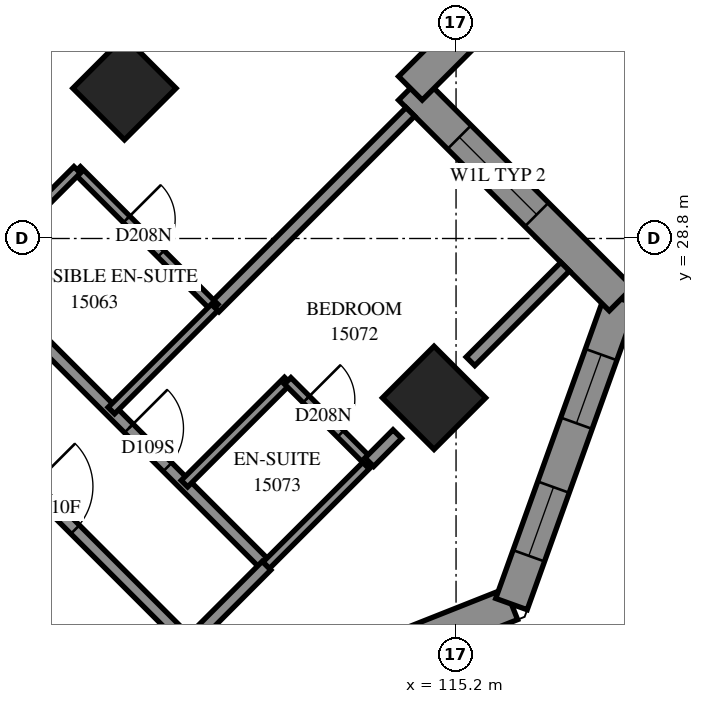
"""IFC4 building model, lengths in metres.
Left out: names, types, materials, properties, quantities, classifications, styles, units other than length and angle.
Written with IfcOpenShell. Run it as: python <this file> out.ifc"""

import sys

from ifc_helpers import new_model, si_unit, direction, frame, frame_2d, origin, origin_2d, place, context, subcontext, project, spatial, polyline, rectangle, outline, extrude, element, fill, save


model = new_model("IFC4")
c1 = context("Model", 3, precision=1e-05, world=origin(), true_north=direction((0.0, 1.0)))
c2 = subcontext(c1, "Body", "Model", "MODEL_VIEW")
j1 = project(units=[si_unit("LENGTHUNIT", "METRE"), si_unit("PLANEANGLEUNIT", "RADIAN")], contexts=[c1])
p1 = place(None, origin())
s1 = spatial("IfcSite", under=j1, at=p1, CompositionType="ELEMENT")
p2 = place(p1, origin())
s2 = spatial("IfcBuilding", under=s1, at=p2, CompositionType="ELEMENT")
p3 = place(p2, frame((0.0, 0.0, 57.6)))
s3 = spatial("IfcBuildingStorey", under=s2, at=p3, CompositionType="ELEMENT", Elevation=57.6)
for number, where, z_axis, x_axis in (
    (1, (109.747, 31.271, 0.0), (0.0, 0.0, 1.0), (0.707, -0.707, 0.0)),
    (2, (114.838, 26.18, 0.0), (0.0, 0.0, 1.0), (0.707, -0.707, 0.0)),
):
    element("IfcColumn", number, at=place(p3, frame(where, z_axis=z_axis, x_axis=x_axis)), inside=s3, PredefinedType="COLUMN", context=c2, shape_type="SweptSolid", body=[
        extrude(rectangle(XDim=1.2, YDim=1.2, at=origin_2d()), origin(), (0.0, 0.0, 1.0), 3.1),
    ])
p4 = place(p3, frame((110.959, 20.744, 0.0), z_axis=(0.0, 0.0, 1.0), x_axis=(0.929534299, 0.36873566, 0.0)))
e3 = element("IfcWall", 3, at=p4, inside=s3, PredefinedType="SOLIDWALL", context=c2, shape_type="SweptSolid", body=[
    extrude(outline(polyline([(0.119, -0.275), (5.667, -0.275), (5.418, 0.275), (-0.119, 0.275), (0.119, -0.275)])), origin(), (0.0, 0.0, 1.0), 3.1),
])
p5 = place(p4, frame((1.226, 0.0, 0.5)))
e4 = element("IfcOpeningElement", 4, at=p5, cuts=e3, PredefinedType="OPENING", context=c2, shape_type="SweptSolid", body=[
    extrude(rectangle(XDim=2.8, YDim=2.45, at=frame_2d((1.4, 1.225))), frame((0.0, 0.285, 0.0), z_axis=(0.0, -1.0, 0.0), x_axis=(1.0, 0.0, 0.0)), (0.0, 0.0, 1.0), 0.57),
])
p6 = place(p3, frame((116.111, 22.788, 0.0), z_axis=(0.0, 0.0, 1.0), x_axis=(0.3382272757, 0.9410644558, 0.0)))
e5 = element("IfcWall", 5, at=p6, inside=s3, PredefinedType="SOLIDWALL", context=c2, shape_type="SweptSolid", body=[
    extrude(outline(polyline([(-0.124, -0.275), (5.506, -0.275), (5.157, 0.275), (0.124, 0.275), (-0.124, -0.275)])), origin(), (0.0, 0.0, 1.0), 3.1),
])
p7 = place(p6, frame((0.844, 0.0, 0.5)))
e6 = element("IfcOpeningElement", 6, at=p7, cuts=e5, PredefinedType="OPENING", context=c2, shape_type="SweptSolid", body=[
    extrude(rectangle(XDim=1.2, YDim=2.45, at=frame_2d((0.6, 1.225))), frame((0.0, 0.285, 0.0), z_axis=(0.0, -1.0, 0.0), x_axis=(1.0, 0.0, 0.0)), (0.0, 0.0, 1.0), 0.57),
])
p8 = place(p6, frame((3.16, 0.0, 0.5)))
e7 = element("IfcOpeningElement", 7, at=p8, cuts=e5, PredefinedType="OPENING", context=c2, shape_type="SweptSolid", body=[
    extrude(rectangle(XDim=1.2, YDim=2.45, at=frame_2d((0.6, 1.225))), frame((0.0, 0.285, 0.0), z_axis=(0.0, -1.0, 0.0), x_axis=(1.0, 0.0, 0.0)), (0.0, 0.0, 1.0), 0.57),
])
p9 = place(p3, frame((117.915, 27.805, 0.0), z_axis=(0.0, 0.0, 1.0), x_axis=(-0.7071067812, 0.7071067812, 0.0)))
e8 = element("IfcWall", 8, at=p9, inside=s3, PredefinedType="SOLIDWALL", context=c2, shape_type="SweptSolid", body=[
    extrude(outline(polyline([(-0.174, -0.275), (4.626, -0.275), (5.176, 0.275), (0.174, 0.275), (-0.174, -0.275)])), origin(), (0.0, 0.0, 1.0), 3.1),
])
p10 = place(p9, frame((1.963, 0.0, 0.6)))
e9 = element("IfcOpeningElement", 9, at=p10, cuts=e8, PredefinedType="OPENING", context=c2, shape_type="SweptSolid", body=[
    extrude(rectangle(XDim=1.8, YDim=1.9, at=frame_2d((0.9, 0.95))), frame((0.0, 0.285, 0.0), z_axis=(0.0, -1.0, 0.0), x_axis=(1.0, 0.0, 0.0)), (0.0, 0.0, 1.0), 0.57),
])
p11 = place(p3, frame((114.449, 31.271, 0.0), z_axis=(0.0, 0.0, 1.0), x_axis=(0.7070982526, 0.7071153096, 0.0)))
e10 = element("IfcWall", 10, at=p11, inside=s3, PredefinedType="SOLIDWALL", context=c2, shape_type="SweptSolid", body=[
    extrude(outline(polyline([(0.275, -0.275), (6.247, -0.275), (5.478, 0.275), (-0.275, 0.275), (0.275, -0.275)])), origin(), (0.0, 0.0, 1.0), 3.1),
])
p12 = place(p11, frame((1.137, 0.0, 0.6)))
e11 = element("IfcOpeningElement", 11, at=p12, cuts=e10, PredefinedType="OPENING", context=c2, shape_type="SweptSolid", body=[
    extrude(rectangle(XDim=1.8, YDim=1.9, at=frame_2d((0.9, 0.95))), frame((0.0, 0.285, 0.0), z_axis=(0.0, -1.0, 0.0), x_axis=(1.0, 0.0, 0.0)), (0.0, 0.0, 1.0), 0.57),
])
p13 = place(p11, frame((3.977, 0.0, 0.6)))
e12 = element("IfcOpeningElement", 12, at=p13, cuts=e10, PredefinedType="OPENING", context=c2, shape_type="SweptSolid", body=[
    extrude(rectangle(XDim=1.2, YDim=1.9, at=frame_2d((0.6, 0.95))), frame((0.0, 0.285, 0.0), z_axis=(0.0, -1.0, 0.0), x_axis=(1.0, 0.0, 0.0)), (0.0, 0.0, 1.0), 0.57),
])
p14 = place(p3, frame((101.825, 31.125, 0.0), z_axis=(0.0, 0.0, 1.0), x_axis=(0.7071067812, -0.7071067812, 0.0)))
e13 = element("IfcWall", 13, at=p14, inside=s3, PredefinedType="PARTITIONING", context=c2, shape_type="SweptSolid", body=[
    extrude(rectangle(XDim=12.7, YDim=0.2, at=frame_2d((6.35, 0.0))), origin(), (0.0, 0.0, 1.0), 3.1),
])
p15 = place(p14, frame((3.895, 0.0, 0.0)))
e14 = element("IfcOpeningElement", 14, at=p15, cuts=e13, PredefinedType="OPENING", context=c2, shape_type="SweptSolid", body=[
    extrude(rectangle(XDim=0.9, YDim=2.1, at=frame_2d((0.45, 1.05))), frame((0.0, 0.11, 0.0), z_axis=(0.0, -1.0, 0.0), x_axis=(1.0, 0.0, 0.0)), (0.0, 0.0, 1.0), 0.22),
])
p16 = place(p14, frame((9.056, 0.0, 0.0)))
e15 = element("IfcOpeningElement", 15, at=p16, cuts=e13, PredefinedType="OPENING", context=c2, shape_type="SweptSolid", body=[
    extrude(rectangle(XDim=1.0, YDim=2.1, at=frame_2d((0.5, 1.05))), frame((0.0, 0.11, 0.0), z_axis=(0.0, -1.0, 0.0), x_axis=(1.0, 0.0, 0.0)), (0.0, 0.0, 1.0), 0.22),
])
p17 = place(p3, frame((106.987, 28.509, 0.0), z_axis=(0.0, 0.0, 1.0), x_axis=(0.7071067812, -0.7071067812, 0.0)))
e16 = element("IfcWall", 16, at=p17, inside=s3, PredefinedType="PARTITIONING", context=c2, shape_type="SweptSolid", body=[
    extrude(rectangle(XDim=7.198, YDim=0.2, at=frame_2d((3.599, 0.0))), origin(), (0.0, 0.0, 1.0), 3.1),
])
p18 = place(p17, frame((4.004, 0.0, 0.0)))
e17 = element("IfcOpeningElement", 17, at=p18, cuts=e16, PredefinedType="OPENING", context=c2, shape_type="SweptSolid", body=[
    extrude(rectangle(XDim=0.9, YDim=2.1, at=frame_2d((0.45, 1.05))), frame((0.0, 0.11, 0.0), z_axis=(0.0, -1.0, 0.0), x_axis=(1.0, 0.0, 0.0)), (0.0, 0.0, 1.0), 0.22),
])
p19 = place(p3, frame((111.231, 27.665, 0.0), z_axis=(0.0, 0.0, 1.0), x_axis=(0.7071067812, 0.7071067812, 0.0)))
e18 = element("IfcWall", 18, at=p19, inside=s3, PredefinedType="PARTITIONING", context=c2, shape_type="SweptSolid", body=[
    extrude(rectangle(XDim=4.55, YDim=0.2, at=frame_2d((2.275, 0.0))), origin(), (0.0, 0.0, 1.0), 3.1),
])
p20 = place(p3, frame((108.97, 29.928, 0.0), z_axis=(0.0, 0.0, 1.0), x_axis=(0.7067942478, -0.7074191764, 0.0)))
e19 = element("IfcWall", 19, at=p20, inside=s3, PredefinedType="PARTITIONING", context=c2, shape_type="SweptSolid", body=[
    extrude(rectangle(XDim=3.2, YDim=0.15, at=frame_2d((1.6, 0.0))), origin(), (0.0, 0.0, 1.0), 3.1),
])
p21 = place(p20, frame((1.148, 0.0, 0.0)))
e20 = element("IfcOpeningElement", 20, at=p21, cuts=e19, PredefinedType="OPENING", context=c2, shape_type="SweptSolid", body=[
    extrude(rectangle(XDim=0.8, YDim=2.1, at=frame_2d((0.4, 1.05))), frame((0.0, 0.085, 0.0), z_axis=(0.0, -1.0, 0.0), x_axis=(1.0, 0.0, 0.0)), (0.0, 0.0, 1.0), 0.17),
])
p22 = place(p3, frame((107.271, 28.231, 0.0), z_axis=(0.0, 0.0, 1.0), x_axis=(0.7071067812, 0.7071067812, 0.0)))
e21 = element("IfcWall", 21, at=p22, inside=s3, PredefinedType="PARTITIONING", context=c2, shape_type="SweptSolid", body=[
    extrude(rectangle(XDim=2.401, YDim=0.15, at=frame_2d((1.201, 0.0))), origin(), (0.0, 0.0, 1.0), 3.1),
])
p23 = place(p3, frame((112.077, 23.425, 0.0), z_axis=(0.0, 0.0, 1.0), x_axis=(0.7075233388, 0.706689978, 0.0)))
e22 = element("IfcWall", 22, at=p23, inside=s3, PredefinedType="PARTITIONING", context=c2, shape_type="SweptSolid", body=[
    extrude(rectangle(XDim=2.4, YDim=0.15, at=frame_2d((1.2, 0.0))), origin(), (0.0, 0.0, 1.0), 2.6),
])
for number, where, z_axis, x_axis in (
    (23, (109.531, 25.971, 0.0), (0.0, 0.0, 1.0), (0.708, 0.707, 0.0)),
    (24, (110.734, 24.768, 0.0), (0.0, 0.0, 1.0), (0.708, 0.707, 0.0)),
):
    element("IfcWall", number, at=place(p3, frame(where, z_axis=z_axis, x_axis=x_axis)), inside=s3, PredefinedType="PARTITIONING", context=c2, shape_type="SweptSolid", body=[
        extrude(rectangle(XDim=2.4, YDim=0.15, at=frame_2d((1.2, 0.0))), origin(), (0.0, 0.0, 1.0), 3.1),
    ])
p24 = place(p3, frame((115.438, 26.78, 0.0), z_axis=(0.0, 0.0, 1.0), x_axis=(0.7071067812, 0.7071067812, 0.0)))
e25 = element("IfcWall", 25, at=p24, inside=s3, PredefinedType="PARTITIONING", context=c2, shape_type="SweptSolid", body=[
    extrude(rectangle(XDim=2.201, YDim=0.2, at=frame_2d((1.101, 0.0))), origin(), (0.0, 0.0, 1.0), 3.1),
])
p25 = place(p3, frame((112.431, 26.459, 0.0), z_axis=(0.0, 0.0, 1.0), x_axis=(0.7071067812, -0.7071067812, 0.0)))
e26 = element("IfcWall", 26, at=p25, inside=s3, PredefinedType="PARTITIONING", context=c2, shape_type="SweptSolid", body=[
    extrude(rectangle(XDim=1.901, YDim=0.15, at=frame_2d((0.95, 0.0))), origin(), (0.0, 0.0, 1.0), 3.1),
])
p26 = place(p25, frame((0.431, 0.0, 0.0)))
e27 = element("IfcOpeningElement", 27, at=p26, cuts=e26, PredefinedType="OPENING", context=c2, shape_type="SweptSolid", body=[
    extrude(rectangle(XDim=0.8, YDim=2.1, at=frame_2d((0.4, 1.05))), frame((0.0, 0.085, 0.0), z_axis=(0.0, -1.0, 0.0), x_axis=(1.0, 0.0, 0.0)), (0.0, 0.0, 1.0), 0.17),
])
p27 = place(p3, frame((110.811, 22.145, 0.0), z_axis=(0.0, 0.0, 1.0), x_axis=(0.7065510983, 0.7076620277, 0.0)))
e28 = element("IfcWall", 28, at=p27, inside=s3, PredefinedType="PARTITIONING", context=c2, shape_type="SweptSolid", body=[
    extrude(rectangle(XDim=1.8, YDim=0.2, at=frame_2d((0.9, 0.0))), origin(), (0.0, 0.0, 1.0), 2.6),
])
p28 = place(p3, frame((113.775, 25.122, 0.0), z_axis=(0.0, 0.0, 1.0), x_axis=(0.705571267, 0.7086389682, 0.0)))
e29 = element("IfcWall", 29, at=p28, inside=s3, PredefinedType="PARTITIONING", context=c2, shape_type="SweptSolid", body=[
    extrude(rectangle(XDim=0.652, YDim=0.2, at=frame_2d((0.326, 0.0))), origin(), (0.0, 0.0, 1.0), 2.6),
])
p29 = place(p7, origin())
e30 = element("IfcWindow", 30, at=p29, inside=s3, PartitioningType="SINGLE_PANEL", PredefinedType="WINDOW", context=c2, shape_type="SweptSolid", body=[
    extrude(rectangle(XDim=1.2, YDim=2.45, at=frame_2d((0.6, 1.225))), frame((0.0, 0.155, 0.0), z_axis=(0.0, -1.0, 0.0), x_axis=(1.0, 0.0, 0.0)), (0.0, 0.0, 1.0), 0.06),
])
fill(e6, e30)
p30 = place(p8, origin())
e31 = element("IfcWindow", 31, at=p30, inside=s3, PartitioningType="SINGLE_PANEL", PredefinedType="WINDOW", context=c2, shape_type="SweptSolid", body=[
    extrude(rectangle(XDim=1.2, YDim=2.45, at=frame_2d((0.6, 1.225))), frame((0.0, 0.155, 0.0), z_axis=(0.0, -1.0, 0.0), x_axis=(1.0, 0.0, 0.0)), (0.0, 0.0, 1.0), 0.06),
])
fill(e7, e31)
p31 = place(p10, origin())
e32 = element("IfcWindow", 32, at=p31, inside=s3, PartitioningType="SINGLE_PANEL", PredefinedType="WINDOW", context=c2, shape_type="SweptSolid", body=[
    extrude(rectangle(XDim=1.8, YDim=1.9, at=frame_2d((0.9, 0.95))), frame((0.0, 0.155, 0.0), z_axis=(0.0, -1.0, 0.0), x_axis=(1.0, 0.0, 0.0)), (0.0, 0.0, 1.0), 0.06),
])
fill(e9, e32)
p32 = place(p21, origin())
e33 = element("IfcDoor", 33, at=p32, inside=s3, OperationType="SINGLE_SWING_RIGHT", PredefinedType="DOOR", context=c2, shape_type="SweptSolid", body=[
    extrude(rectangle(XDim=0.8, YDim=2.1, at=frame_2d((0.4, 1.05))), frame((0.0, 0.025, 0.0), z_axis=(0.0, -1.0, 0.0), x_axis=(1.0, 0.0, 0.0)), (0.0, 0.0, 1.0), 0.05),
])
fill(e20, e33)
p33 = place(p16, origin())
e34 = element("IfcDoor", 34, at=p33, inside=s3, OperationType="SINGLE_SWING_RIGHT", PredefinedType="DOOR", context=c2, shape_type="SweptSolid", body=[
    extrude(rectangle(XDim=1.0, YDim=2.1, at=frame_2d((0.5, 1.05))), frame((0.0, 0.025, 0.0), z_axis=(0.0, -1.0, 0.0), x_axis=(1.0, 0.0, 0.0)), (0.0, 0.0, 1.0), 0.05),
])
fill(e15, e34)
p34 = place(p18, origin())
e35 = element("IfcDoor", 35, at=p34, inside=s3, OperationType="SINGLE_SWING_RIGHT", PredefinedType="DOOR", context=c2, shape_type="SweptSolid", body=[
    extrude(rectangle(XDim=0.9, YDim=2.1, at=frame_2d((0.45, 1.05))), frame((0.0, 0.025, 0.0), z_axis=(0.0, -1.0, 0.0), x_axis=(1.0, 0.0, 0.0)), (0.0, 0.0, 1.0), 0.05),
])
fill(e17, e35)
p35 = place(p26, origin())
e36 = element("IfcDoor", 36, at=p35, inside=s3, OperationType="SINGLE_SWING_RIGHT", PredefinedType="DOOR", context=c2, shape_type="SweptSolid", body=[
    extrude(rectangle(XDim=0.8, YDim=2.1, at=frame_2d((0.4, 1.05))), frame((0.0, 0.025, 0.0), z_axis=(0.0, -1.0, 0.0), x_axis=(1.0, 0.0, 0.0)), (0.0, 0.0, 1.0), 0.05),
])
fill(e27, e36)
save(model, sys.argv[1])
